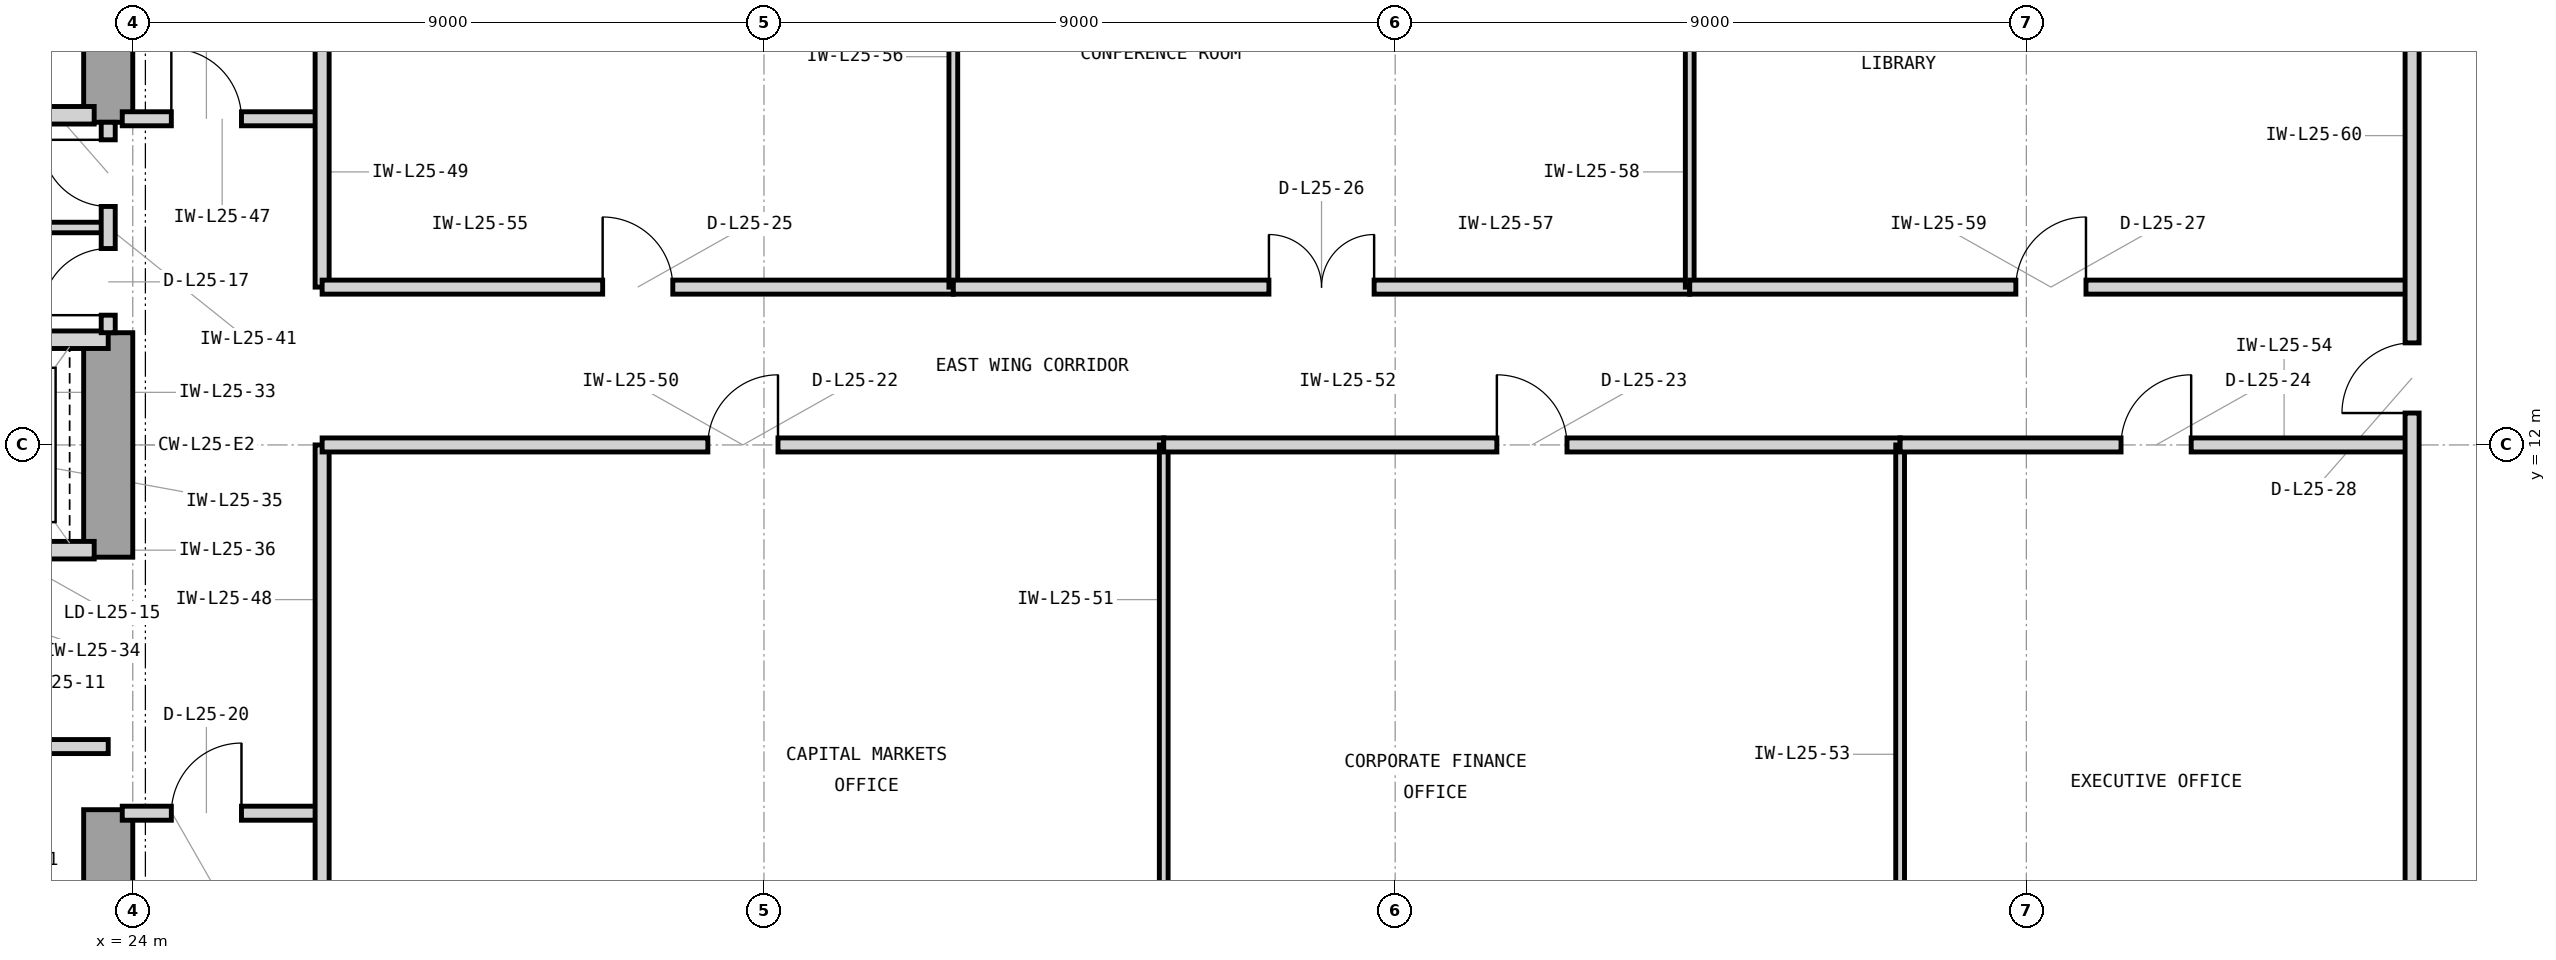
"""IFC4 building model, lengths in metres.
Left out: names, types, materials, properties, quantities, classifications, styles, units other than length and angle.
Written with IfcOpenShell. Run it as: python <this file> out.ifc"""

import sys

from ifc_helpers import new_model, si_unit, direction, frame, frame_2d, origin, place, context, subcontext, project, spatial, rectangle, extrude, element, fill, save


model = new_model("IFC4")
c1 = context("Model", 3, precision=1e-05, world=origin(), true_north=direction((0.0, 1.0)))
c2 = subcontext(c1, "Body", "Model", "MODEL_VIEW")
j1 = project(units=[si_unit("LENGTHUNIT", "METRE"), si_unit("PLANEANGLEUNIT", "RADIAN")], contexts=[c1])
p1 = place(None, origin())
s1 = spatial("IfcSite", under=j1, at=p1, CompositionType="ELEMENT")
p2 = place(p1, origin())
s2 = spatial("IfcBuilding", under=s1, at=p2, CompositionType="ELEMENT")
p3 = place(p2, frame((0.0, 0.0, 108.9)))
s3 = spatial("IfcBuildingStorey", under=s2, at=p3, CompositionType="ELEMENT", Elevation=108.9)
p4 = place(p3, frame((23.65, 3.7, 0.0), z_axis=(0.0, 0.0, 1.0), x_axis=(0.0, 1.0, 0.0)))
e1 = element("IfcWall", 1, at=p4, inside=s3, PredefinedType="SHEAR", context=c2, shape_type="SweptSolid", body=[
    extrude(rectangle(XDim=3.1, YDim=0.7, at=frame_2d((1.55, 0.0))), origin(), (0.0, 0.0, 1.0), 3.9),
])
p5 = place(p3, frame((23.65, 10.4, 0.0), z_axis=(0.0, 0.0, 1.0), x_axis=(0.0, 1.0, 0.0)))
e2 = element("IfcWall", 2, at=p5, inside=s3, PredefinedType="SHEAR", context=c2, shape_type="SweptSolid", body=[
    extrude(rectangle(XDim=3.2, YDim=0.7, at=frame_2d((1.6, 0.0))), origin(), (0.0, 0.0, 1.0), 3.9),
])
p6 = place(p3, frame((23.65, 16.6, 0.0), z_axis=(0.0, 0.0, 1.0), x_axis=(0.0, 1.0, 0.0)))
e3 = element("IfcWall", 3, at=p6, inside=s3, PredefinedType="SHEAR", context=c2, shape_type="SweptSolid", body=[
    extrude(rectangle(XDim=4.05, YDim=0.7, at=frame_2d((2.025, 0.0))), origin(), (0.0, 0.0, 1.0), 3.9),
])
p7 = place(p3, frame((21.05, 16.7, 0.0), z_axis=(0.0, 0.0, 1.0), x_axis=(1.0, 0.0, 0.0)))
e4 = element("IfcWall", 4, at=p7, inside=s3, PredefinedType="PARTITIONING", context=c2, shape_type="SweptSolid", body=[
    extrude(rectangle(XDim=2.4, YDim=0.25, at=frame_2d((1.2, 0.0))), origin(), (0.0, 0.0, 1.0), 3.227),
])
p8 = place(p3, frame((19.15, 7.7, 0.0), z_axis=(0.0, 0.0, 1.0), x_axis=(1.0, 0.0, 0.0)))
e5 = element("IfcWall", 5, at=p8, inside=s3, PredefinedType="PARTITIONING", context=c2, shape_type="SweptSolid", body=[
    extrude(rectangle(XDim=4.5, YDim=0.2, at=frame_2d((2.25, 0.0))), origin(), (0.0, 0.0, 1.0), 3.69),
])
p9 = place(p8, frame((1.75, 0.0, 0.0)))
e6 = element("IfcOpeningElement", 6, at=p9, cuts=e5, PredefinedType="OPENING", context=c2, shape_type="SweptSolid", body=[
    extrude(rectangle(XDim=1.0, YDim=2.15, at=frame_2d((0.5, 1.075))), frame((0.0, 0.11, 0.0), z_axis=(0.0, -1.0, 0.0), x_axis=(1.0, 0.0, 0.0)), (0.0, 0.0, 1.0), 0.22),
])
p10 = place(p3, frame((21.05, 10.5, 0.0), z_axis=(0.0, 0.0, 1.0), x_axis=(1.0, 0.0, 0.0)))
e7 = element("IfcWall", 7, at=p10, inside=s3, PredefinedType="PARTITIONING", context=c2, shape_type="SweptSolid", body=[
    extrude(rectangle(XDim=2.4, YDim=0.25, at=frame_2d((1.2, 0.0))), origin(), (0.0, 0.0, 1.0), 3.227),
])
p11 = place(p10, frame((0.48, 0.0, 0.0)))
e8 = element("IfcOpeningElement", 8, at=p11, cuts=e7, PredefinedType="OPENING", context=c2, shape_type="SweptSolid", body=[
    extrude(rectangle(XDim=1.15, YDim=2.25, at=frame_2d((0.575, 1.125))), frame((0.0, 0.135, 0.0), z_axis=(0.0, -1.0, 0.0), x_axis=(1.0, 0.0, 0.0)), (0.0, 0.0, 1.0), 0.27),
])
p12 = place(p3, frame((14.7, 13.5, 0.0), z_axis=(0.0, 0.0, 1.0), x_axis=(1.0, 0.0, 0.0)))
e9 = element("IfcWall", 9, at=p12, inside=s3, PredefinedType="PARTITIONING", context=c2, shape_type="SweptSolid", body=[
    extrude(rectangle(XDim=8.95, YDim=0.25, at=frame_2d((4.475, 0.0))), origin(), (0.0, 0.0, 1.0), 3.227),
])
p13 = place(p3, frame((19.65, 15.1, 0.0), z_axis=(0.0, 0.0, 1.0), x_axis=(1.0, 0.0, 0.0)))
e10 = element("IfcWall", 10, at=p13, inside=s3, PredefinedType="PARTITIONING", context=c2, shape_type="SweptSolid", body=[
    extrude(rectangle(XDim=4.0, YDim=0.15, at=frame_2d((2.0, 0.0))), origin(), (0.0, 0.0, 1.0), 3.69),
])
p14 = place(p3, frame((23.65, 13.6, 0.0), z_axis=(0.0, 0.0, 1.0), x_axis=(0.0, 1.0, 0.0)))
e11 = element("IfcWall", 11, at=p14, inside=s3, PredefinedType="PARTITIONING", context=c2, shape_type="SweptSolid", body=[
    extrude(rectangle(XDim=3.0, YDim=0.2, at=frame_2d((1.5, 0.0))), origin(), (0.0, 0.0, 1.0), 3.69),
])
p15 = place(p14, frame((0.25, 0.0, 0.0)))
e12 = element("IfcOpeningElement", 12, at=p15, cuts=e11, PredefinedType="OPENING", context=c2, shape_type="SweptSolid", body=[
    extrude(rectangle(XDim=0.95, YDim=2.1, at=frame_2d((0.475, 1.05))), frame((0.0, 0.11, 0.0), z_axis=(0.0, -1.0, 0.0), x_axis=(1.0, 0.0, 0.0)), (0.0, 0.0, 1.0), 0.22),
])
p16 = place(p14, frame((1.8, 0.0, 0.0)))
e13 = element("IfcOpeningElement", 13, at=p16, cuts=e11, PredefinedType="OPENING", context=c2, shape_type="SweptSolid", body=[
    extrude(rectangle(XDim=0.95, YDim=2.1, at=frame_2d((0.475, 1.05))), frame((0.0, 0.11, 0.0), z_axis=(0.0, -1.0, 0.0), x_axis=(1.0, 0.0, 0.0)), (0.0, 0.0, 1.0), 0.22),
])
p17 = place(p3, frame((23.85, 6.75, 0.0), z_axis=(0.0, 0.0, 1.0), x_axis=(1.0, 0.0, 0.0)))
e14 = element("IfcWall", 14, at=p17, inside=s3, PredefinedType="PARTITIONING", context=c2, shape_type="SweptSolid", body=[
    extrude(rectangle(XDim=2.85, YDim=0.2, at=frame_2d((1.425, 0.0))), origin(), (0.0, 0.0, 1.0), 3.69),
])
p18 = place(p17, frame((0.7, 0.0, 0.0)))
e15 = element("IfcOpeningElement", 15, at=p18, cuts=e14, PredefinedType="OPENING", context=c2, shape_type="SweptSolid", body=[
    extrude(rectangle(XDim=1.0, YDim=2.15, at=frame_2d((0.5, 1.075))), frame((0.0, 0.11, 0.0), z_axis=(0.0, -1.0, 0.0), x_axis=(1.0, 0.0, 0.0)), (0.0, 0.0, 1.0), 0.22),
])
p19 = place(p3, frame((23.85, 16.65, 0.0), z_axis=(0.0, 0.0, 1.0), x_axis=(1.0, 0.0, 0.0)))
e16 = element("IfcWall", 16, at=p19, inside=s3, PredefinedType="PARTITIONING", context=c2, shape_type="SweptSolid", body=[
    extrude(rectangle(XDim=2.85, YDim=0.2, at=frame_2d((1.425, 0.0))), origin(), (0.0, 0.0, 1.0), 3.69),
])
p20 = place(p19, frame((0.7, 0.0, 0.0)))
e17 = element("IfcOpeningElement", 17, at=p20, cuts=e16, PredefinedType="OPENING", context=c2, shape_type="SweptSolid", body=[
    extrude(rectangle(XDim=1.0, YDim=2.15, at=frame_2d((0.5, 1.075))), frame((0.0, 0.11, 0.0), z_axis=(0.0, -1.0, 0.0), x_axis=(1.0, 0.0, 0.0)), (0.0, 0.0, 1.0), 0.22),
])
p21 = place(p3, frame((26.7, 3.18, 0.0), z_axis=(0.0, 0.0, 1.0), x_axis=(0.0, 1.0, 0.0)))
e18 = element("IfcWall", 18, at=p21, inside=s3, PredefinedType="PARTITIONING", context=c2, shape_type="SweptSolid", body=[
    extrude(rectangle(XDim=8.82, YDim=0.2, at=frame_2d((4.41, 0.0))), origin(), (0.0, 0.0, 1.0), 3.69),
])
p22 = place(p3, frame((26.7, 14.25, 0.0), z_axis=(0.0, 0.0, 1.0), x_axis=(0.0, 1.0, 0.0)))
e19 = element("IfcWall", 19, at=p22, inside=s3, PredefinedType="PARTITIONING", context=c2, shape_type="SweptSolid", body=[
    extrude(rectangle(XDim=6.57, YDim=0.2, at=frame_2d((3.285, 0.0))), origin(), (0.0, 0.0, 1.0), 3.69),
])
p23 = place(p3, frame((26.7, 12.0, 0.0), z_axis=(0.0, 0.0, 1.0), x_axis=(1.0, 0.0, 0.0)))
e20 = element("IfcWall", 20, at=p23, inside=s3, PredefinedType="PARTITIONING", context=c2, shape_type="SweptSolid", body=[
    extrude(rectangle(XDim=12.0, YDim=0.2, at=frame_2d((6.0, 0.0))), origin(), (0.0, 0.0, 1.0), 3.227),
])
p24 = place(p23, frame((5.5, 0.0, 0.0)))
e21 = element("IfcOpeningElement", 21, at=p24, cuts=e20, PredefinedType="OPENING", context=c2, shape_type="SweptSolid", body=[
    extrude(rectangle(XDim=1.0, YDim=2.15, at=frame_2d((0.5, 1.075))), frame((0.0, 0.11, 0.0), z_axis=(0.0, -1.0, 0.0), x_axis=(1.0, 0.0, 0.0)), (0.0, 0.0, 1.0), 0.22),
])
p25 = place(p3, frame((38.7, 3.18, 0.0), z_axis=(0.0, 0.0, 1.0), x_axis=(0.0, 1.0, 0.0)))
e22 = element("IfcWall", 22, at=p25, inside=s3, PredefinedType="PARTITIONING", context=c2, shape_type="SweptSolid", body=[
    extrude(rectangle(XDim=8.82, YDim=0.125, at=frame_2d((4.41, 0.0))), origin(), (0.0, 0.0, 1.0), 3.69),
])
p26 = place(p3, frame((38.7, 12.0, 0.0), z_axis=(0.0, 0.0, 1.0), x_axis=(1.0, 0.0, 0.0)))
e23 = element("IfcWall", 23, at=p26, inside=s3, PredefinedType="PARTITIONING", context=c2, shape_type="SweptSolid", body=[
    extrude(rectangle(XDim=10.5, YDim=0.2, at=frame_2d((5.25, 0.0))), origin(), (0.0, 0.0, 1.0), 3.227),
])
p27 = place(p26, frame((4.75, 0.0, 0.0)))
e24 = element("IfcOpeningElement", 24, at=p27, cuts=e23, PredefinedType="OPENING", context=c2, shape_type="SweptSolid", body=[
    extrude(rectangle(XDim=1.0, YDim=2.15, at=frame_2d((0.5, 1.075))), frame((0.0, 0.11, 0.0), z_axis=(0.0, -1.0, 0.0), x_axis=(1.0, 0.0, 0.0)), (0.0, 0.0, 1.0), 0.22),
])
p28 = place(p3, frame((49.2, 3.18, 0.0), z_axis=(0.0, 0.0, 1.0), x_axis=(0.0, 1.0, 0.0)))
e25 = element("IfcWall", 25, at=p28, inside=s3, PredefinedType="PARTITIONING", context=c2, shape_type="SweptSolid", body=[
    extrude(rectangle(XDim=8.82, YDim=0.125, at=frame_2d((4.41, 0.0))), origin(), (0.0, 0.0, 1.0), 3.69),
])
p29 = place(p3, frame((49.2, 12.0, 0.0), z_axis=(0.0, 0.0, 1.0), x_axis=(1.0, 0.0, 0.0)))
e26 = element("IfcWall", 26, at=p29, inside=s3, PredefinedType="PARTITIONING", context=c2, shape_type="SweptSolid", body=[
    extrude(rectangle(XDim=7.3, YDim=0.2, at=frame_2d((3.65, 0.0))), origin(), (0.0, 0.0, 1.0), 3.227),
])
p30 = place(p29, frame((3.15, 0.0, 0.0)))
e27 = element("IfcOpeningElement", 27, at=p30, cuts=e26, PredefinedType="OPENING", context=c2, shape_type="SweptSolid", body=[
    extrude(rectangle(XDim=1.0, YDim=2.15, at=frame_2d((0.5, 1.075))), frame((0.0, 0.11, 0.0), z_axis=(0.0, -1.0, 0.0), x_axis=(1.0, 0.0, 0.0)), (0.0, 0.0, 1.0), 0.22),
])
p31 = place(p3, frame((26.7, 14.25, 0.0), z_axis=(0.0, 0.0, 1.0), x_axis=(1.0, 0.0, 0.0)))
e28 = element("IfcWall", 28, at=p31, inside=s3, PredefinedType="PARTITIONING", context=c2, shape_type="SweptSolid", body=[
    extrude(rectangle(XDim=9.0, YDim=0.2, at=frame_2d((4.5, 0.0))), origin(), (0.0, 0.0, 1.0), 3.69),
])
p32 = place(p31, frame((4.0, 0.0, 0.0)))
e29 = element("IfcOpeningElement", 29, at=p32, cuts=e28, PredefinedType="OPENING", context=c2, shape_type="SweptSolid", body=[
    extrude(rectangle(XDim=1.0, YDim=2.15, at=frame_2d((0.5, 1.075))), frame((0.0, 0.11, 0.0), z_axis=(0.0, -1.0, 0.0), x_axis=(1.0, 0.0, 0.0)), (0.0, 0.0, 1.0), 0.22),
])
p33 = place(p3, frame((35.7, 14.25, 0.0), z_axis=(0.0, 0.0, 1.0), x_axis=(0.0, 1.0, 0.0)))
e30 = element("IfcWall", 30, at=p33, inside=s3, PredefinedType="PARTITIONING", context=c2, shape_type="SweptSolid", body=[
    extrude(rectangle(XDim=6.57, YDim=0.125, at=frame_2d((3.285, 0.0))), origin(), (0.0, 0.0, 1.0), 3.69),
])
p34 = place(p3, frame((35.7, 14.25, 0.0), z_axis=(0.0, 0.0, 1.0), x_axis=(1.0, 0.0, 0.0)))
e31 = element("IfcWall", 31, at=p34, inside=s3, PredefinedType="PARTITIONING", context=c2, shape_type="SweptSolid", body=[
    extrude(rectangle(XDim=10.5, YDim=0.2, at=frame_2d((5.25, 0.0))), origin(), (0.0, 0.0, 1.0), 3.69),
])
p35 = place(p34, frame((4.5, 0.0, 0.0)))
e32 = element("IfcOpeningElement", 32, at=p35, cuts=e31, PredefinedType="OPENING", context=c2, shape_type="SweptSolid", body=[
    extrude(rectangle(XDim=1.5, YDim=2.3, at=frame_2d((0.75, 1.15))), frame((0.0, 0.11, 0.0), z_axis=(0.0, -1.0, 0.0), x_axis=(1.0, 0.0, 0.0)), (0.0, 0.0, 1.0), 0.22),
])
p36 = place(p3, frame((46.2, 14.25, 0.0), z_axis=(0.0, 0.0, 1.0), x_axis=(0.0, 1.0, 0.0)))
e33 = element("IfcWall", 33, at=p36, inside=s3, PredefinedType="PARTITIONING", context=c2, shape_type="SweptSolid", body=[
    extrude(rectangle(XDim=6.57, YDim=0.125, at=frame_2d((3.285, 0.0))), origin(), (0.0, 0.0, 1.0), 3.69),
])
p37 = place(p3, frame((46.2, 14.25, 0.0), z_axis=(0.0, 0.0, 1.0), x_axis=(1.0, 0.0, 0.0)))
e34 = element("IfcWall", 34, at=p37, inside=s3, PredefinedType="PARTITIONING", context=c2, shape_type="SweptSolid", body=[
    extrude(rectangle(XDim=10.3, YDim=0.2, at=frame_2d((5.15, 0.0))), origin(), (0.0, 0.0, 1.0), 3.69),
])
p38 = place(p37, frame((4.65, 0.0, 0.0)))
e35 = element("IfcOpeningElement", 35, at=p38, cuts=e34, PredefinedType="OPENING", context=c2, shape_type="SweptSolid", body=[
    extrude(rectangle(XDim=1.0, YDim=2.15, at=frame_2d((0.5, 1.075))), frame((0.0, 0.11, 0.0), z_axis=(0.0, -1.0, 0.0), x_axis=(1.0, 0.0, 0.0)), (0.0, 0.0, 1.0), 0.22),
])
p39 = place(p3, frame((56.5, 3.18, 0.0), z_axis=(0.0, 0.0, 1.0), x_axis=(0.0, 1.0, 0.0)))
e36 = element("IfcWall", 36, at=p39, inside=s3, PredefinedType="PARTITIONING", context=c2, shape_type="SweptSolid", body=[
    extrude(rectangle(XDim=17.64, YDim=0.2, at=frame_2d((8.82, 0.0))), origin(), (0.0, 0.0, 1.0), 3.69),
])
p40 = place(p39, frame((9.275, 0.0, 0.0)))
e37 = element("IfcOpeningElement", 37, at=p40, cuts=e36, PredefinedType="OPENING", context=c2, shape_type="SweptSolid", body=[
    extrude(rectangle(XDim=1.0, YDim=2.15, at=frame_2d((0.5, 1.075))), frame((0.0, 0.11, 0.0), z_axis=(0.0, -1.0, 0.0), x_axis=(1.0, 0.0, 0.0)), (0.0, 0.0, 1.0), 0.22),
])
p41 = place(p15, origin())
e38 = element("IfcDoor", 38, at=p41, inside=s3, OperationType="SINGLE_SWING_LEFT", PredefinedType="DOOR", context=c2, shape_type="SweptSolid", body=[
    extrude(rectangle(XDim=0.95, YDim=2.1, at=frame_2d((0.475, 1.05))), frame((0.0, 0.025, 0.0), z_axis=(0.0, -1.0, 0.0), x_axis=(1.0, 0.0, 0.0)), (0.0, 0.0, 1.0), 0.05),
])
fill(e12, e38)
p42 = place(p16, origin())
e39 = element("IfcDoor", 39, at=p42, inside=s3, OperationType="SINGLE_SWING_RIGHT", PredefinedType="DOOR", context=c2, shape_type="SweptSolid", body=[
    extrude(rectangle(XDim=0.95, YDim=2.1, at=frame_2d((0.475, 1.05))), frame((0.0, 0.025, 0.0), z_axis=(0.0, -1.0, 0.0), x_axis=(1.0, 0.0, 0.0)), (0.0, 0.0, 1.0), 0.05),
])
fill(e13, e39)
p43 = place(p18, origin())
e40 = element("IfcDoor", 40, at=p43, inside=s3, OperationType="SINGLE_SWING_RIGHT", PredefinedType="DOOR", context=c2, shape_type="SweptSolid", body=[
    extrude(rectangle(XDim=1.0, YDim=2.15, at=frame_2d((0.5, 1.075))), frame((0.0, 0.025, 0.0), z_axis=(0.0, -1.0, 0.0), x_axis=(1.0, 0.0, 0.0)), (0.0, 0.0, 1.0), 0.05),
])
fill(e15, e40)
p44 = place(p20, origin())
e41 = element("IfcDoor", 41, at=p44, inside=s3, OperationType="SINGLE_SWING_LEFT", PredefinedType="DOOR", context=c2, shape_type="SweptSolid", body=[
    extrude(rectangle(XDim=1.0, YDim=2.15, at=frame_2d((0.5, 1.075))), frame((0.0, 0.025, 0.0), z_axis=(0.0, -1.0, 0.0), x_axis=(1.0, 0.0, 0.0)), (0.0, 0.0, 1.0), 0.05),
])
fill(e17, e41)
p45 = place(p24, origin())
e42 = element("IfcDoor", 42, at=p45, inside=s3, OperationType="SINGLE_SWING_RIGHT", PredefinedType="DOOR", context=c2, shape_type="SweptSolid", body=[
    extrude(rectangle(XDim=1.0, YDim=2.15, at=frame_2d((0.5, 1.075))), frame((0.0, 0.025, 0.0), z_axis=(0.0, -1.0, 0.0), x_axis=(1.0, 0.0, 0.0)), (0.0, 0.0, 1.0), 0.05),
])
fill(e21, e42)
p46 = place(p27, origin())
e43 = element("IfcDoor", 43, at=p46, inside=s3, OperationType="SINGLE_SWING_LEFT", PredefinedType="DOOR", context=c2, shape_type="SweptSolid", body=[
    extrude(rectangle(XDim=1.0, YDim=2.15, at=frame_2d((0.5, 1.075))), frame((0.0, 0.025, 0.0), z_axis=(0.0, -1.0, 0.0), x_axis=(1.0, 0.0, 0.0)), (0.0, 0.0, 1.0), 0.05),
])
fill(e24, e43)
p47 = place(p30, origin())
e44 = element("IfcDoor", 44, at=p47, inside=s3, OperationType="SINGLE_SWING_RIGHT", PredefinedType="DOOR", context=c2, shape_type="SweptSolid", body=[
    extrude(rectangle(XDim=1.0, YDim=2.15, at=frame_2d((0.5, 1.075))), frame((0.0, 0.025, 0.0), z_axis=(0.0, -1.0, 0.0), x_axis=(1.0, 0.0, 0.0)), (0.0, 0.0, 1.0), 0.05),
])
fill(e27, e44)
p48 = place(p32, origin())
e45 = element("IfcDoor", 45, at=p48, inside=s3, OperationType="SINGLE_SWING_LEFT", PredefinedType="DOOR", context=c2, shape_type="SweptSolid", body=[
    extrude(rectangle(XDim=1.0, YDim=2.15, at=frame_2d((0.5, 1.075))), frame((0.0, 0.025, 0.0), z_axis=(0.0, -1.0, 0.0), x_axis=(1.0, 0.0, 0.0)), (0.0, 0.0, 1.0), 0.05),
])
fill(e29, e45)
p49 = place(p35, origin())
e46 = element("IfcDoor", 46, at=p49, inside=s3, OperationType="DOUBLE_DOOR_SINGLE_SWING", PredefinedType="DOOR", context=c2, shape_type="SweptSolid", body=[
    extrude(rectangle(XDim=1.5, YDim=2.3, at=frame_2d((0.75, 1.15))), frame((0.0, 0.025, 0.0), z_axis=(0.0, -1.0, 0.0), x_axis=(1.0, 0.0, 0.0)), (0.0, 0.0, 1.0), 0.05),
])
fill(e32, e46)
p50 = place(p38, origin())
e47 = element("IfcDoor", 47, at=p50, inside=s3, OperationType="SINGLE_SWING_RIGHT", PredefinedType="DOOR", context=c2, shape_type="SweptSolid", body=[
    extrude(rectangle(XDim=1.0, YDim=2.15, at=frame_2d((0.5, 1.075))), frame((0.0, 0.025, 0.0), z_axis=(0.0, -1.0, 0.0), x_axis=(1.0, 0.0, 0.0)), (0.0, 0.0, 1.0), 0.05),
])
fill(e35, e47)
p51 = place(p40, origin())
e48 = element("IfcDoor", 48, at=p51, inside=s3, OperationType="SINGLE_SWING_LEFT", PredefinedType="DOOR", context=c2, shape_type="SweptSolid", body=[
    extrude(rectangle(XDim=1.0, YDim=2.15, at=frame_2d((0.5, 1.075))), frame((0.0, 0.025, 0.0), z_axis=(0.0, -1.0, 0.0), x_axis=(1.0, 0.0, 0.0)), (0.0, 0.0, 1.0), 0.05),
])
fill(e37, e48)
save(model, sys.argv[1])
